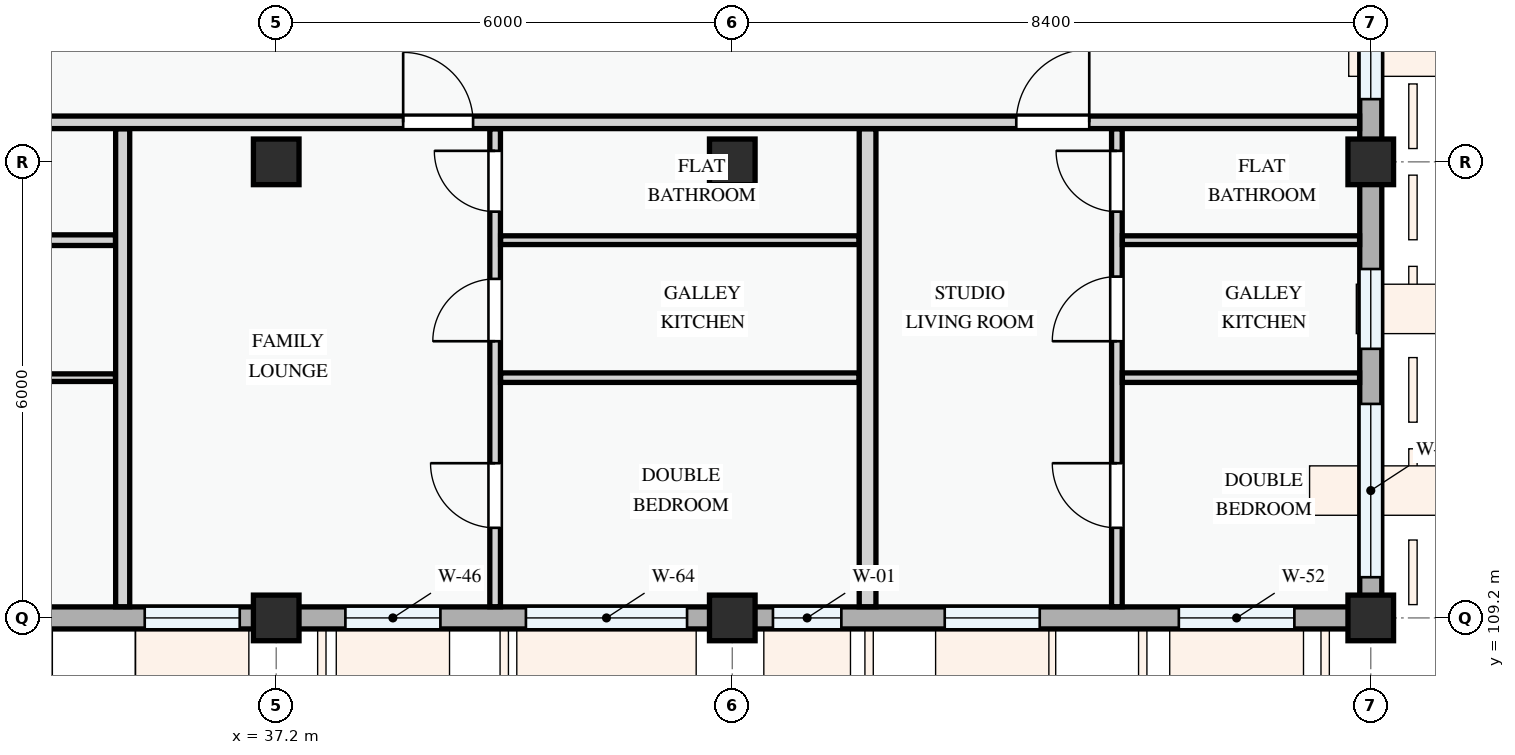
"""IFC4 building model, lengths in metres.
Left out: names, types, materials, properties, quantities, classifications, styles, units other than length and angle.
Written with IfcOpenShell. Run it as: python <this file> out.ifc"""

import sys

from ifc_helpers import new_model, si_unit, direction, frame, frame_2d, origin, origin_2d, place, context, subcontext, project, spatial, rectangle, extrude, element, fill, save


model = new_model("IFC4")
c1 = context("Model", 3, precision=1e-05, world=origin(), true_north=direction((0.0, 1.0)))
c2 = subcontext(c1, "Body", "Model", "MODEL_VIEW")
j1 = project(units=[si_unit("LENGTHUNIT", "METRE"), si_unit("PLANEANGLEUNIT", "RADIAN")], contexts=[c1])
p1 = place(None, origin())
s1 = spatial("IfcSite", under=j1, at=p1, CompositionType="ELEMENT")
p2 = place(p1, origin())
s2 = spatial("IfcBuilding", under=s1, at=p2, CompositionType="ELEMENT")
p3 = place(p2, frame((0.0, 0.0, 27.9)))
s3 = spatial("IfcBuildingStorey", under=s2, at=p3, CompositionType="ELEMENT", Elevation=27.9)
for number, where, z_axis, x_axis in (
    (1, (37.2, 109.2, 0.0), (0.0, 0.0, 1.0), (1.0, 0.0, 0.0)),
    (2, (37.2, 115.2, 0.0), (0.0, 0.0, 1.0), (1.0, 0.0, 0.0)),
    (3, (43.2, 109.2, 0.0), (0.0, 0.0, 1.0), (1.0, 0.0, 0.0)),
    (4, (43.2, 115.2, 0.0), (0.0, 0.0, 1.0), (1.0, 0.0, 0.0)),
    (5, (51.6, 109.2, 0.0), (0.0, 0.0, 1.0), (1.0, 0.0, 0.0)),
    (6, (51.6, 115.2, 0.0), (0.0, 0.0, 1.0), (1.0, 0.0, 0.0)),
):
    element("IfcColumn", number, at=place(p3, frame(where, z_axis=z_axis, x_axis=x_axis)), inside=s3, PredefinedType="COLUMN", context=c2, shape_type="SweptSolid", body=[
        extrude(rectangle(XDim=0.6, YDim=0.6, at=origin_2d()), origin(), (0.0, 0.0, 1.0), 3.3),
    ])
p4 = place(p3, frame((28.8, 109.2, 0.0), z_axis=(0.0, 0.0, 1.0), x_axis=(1.0, 0.0, 0.0)))
e7 = element("IfcWall", 7, at=p4, inside=s3, PredefinedType="STANDARD", context=c2, shape_type="SweptSolid", body=[
    extrude(rectangle(XDim=8.4, YDim=0.29, at=frame_2d((4.2, 0.0))), origin(), (0.0, 0.0, 1.0), 2.375),
])
p5 = place(p4, frame((0.478, 0.0, 0.78)))
e8 = element("IfcOpeningElement", 8, at=p5, cuts=e7, PredefinedType="OPENING", context=c2, shape_type="SweptSolid", body=[
    extrude(rectangle(XDim=1.0, YDim=1.25, at=frame_2d((0.5, 0.625))), frame((0.0, 0.155, 0.0), z_axis=(0.0, -1.0, 0.0), x_axis=(1.0, 0.0, 0.0)), (0.0, 0.0, 1.0), 0.31),
])
p6 = place(p4, frame((3.548, 0.0, 0.78)))
e9 = element("IfcOpeningElement", 9, at=p6, cuts=e7, PredefinedType="OPENING", context=c2, shape_type="SweptSolid", body=[
    extrude(rectangle(XDim=1.05, YDim=1.2, at=frame_2d((0.525, 0.6))), frame((0.0, 0.155, 0.0), z_axis=(0.0, -1.0, 0.0), x_axis=(1.0, 0.0, 0.0)), (0.0, 0.0, 1.0), 0.31),
])
p7 = place(p4, frame((6.67, 0.0, 0.78)))
e10 = element("IfcOpeningElement", 10, at=p7, cuts=e7, PredefinedType="OPENING", context=c2, shape_type="SweptSolid", body=[
    extrude(rectangle(XDim=1.25, YDim=1.45, at=frame_2d((0.625, 0.725))), frame((0.0, 0.155, 0.0), z_axis=(0.0, -1.0, 0.0), x_axis=(1.0, 0.0, 0.0)), (0.0, 0.0, 1.0), 0.31),
])
p8 = place(p3, frame((37.2, 109.2, 0.0), z_axis=(0.0, 0.0, 1.0), x_axis=(1.0, 0.0, 0.0)))
e11 = element("IfcWall", 11, at=p8, inside=s3, PredefinedType="STANDARD", context=c2, shape_type="SweptSolid", body=[
    extrude(rectangle(XDim=6.0, YDim=0.29, at=frame_2d((3.0, 0.0))), origin(), (0.0, 0.0, 1.0), 2.475),
])
p9 = place(p8, frame((0.91, 0.0, 0.78)))
e12 = element("IfcOpeningElement", 12, at=p9, cuts=e11, PredefinedType="OPENING", context=c2, shape_type="SweptSolid", body=[
    extrude(rectangle(XDim=1.25, YDim=1.3, at=frame_2d((0.625, 0.65))), frame((0.0, 0.155, 0.0), z_axis=(0.0, -1.0, 0.0), x_axis=(1.0, 0.0, 0.0)), (0.0, 0.0, 1.0), 0.31),
])
p10 = place(p8, frame((3.285, 0.0, 0.78)))
e13 = element("IfcOpeningElement", 13, at=p10, cuts=e11, PredefinedType="OPENING", context=c2, shape_type="SweptSolid", body=[
    extrude(rectangle(XDim=2.12, YDim=1.44, at=frame_2d((1.06, 0.72))), frame((0.0, 0.155, 0.0), z_axis=(0.0, -1.0, 0.0), x_axis=(1.0, 0.0, 0.0)), (0.0, 0.0, 1.0), 0.31),
])
p11 = place(p3, frame((43.2, 109.2, 0.0), z_axis=(0.0, 0.0, 1.0), x_axis=(1.0, 0.0, 0.0)))
e14 = element("IfcWall", 14, at=p11, inside=s3, PredefinedType="STANDARD", context=c2, shape_type="SweptSolid", body=[
    extrude(rectangle(XDim=8.4, YDim=0.29, at=frame_2d((4.2, 0.0))), origin(), (0.0, 0.0, 1.0), 2.375),
])
p12 = place(p11, frame((0.535, 0.0, 0.78)))
e15 = element("IfcOpeningElement", 15, at=p12, cuts=e14, PredefinedType="OPENING", context=c2, shape_type="SweptSolid", body=[
    extrude(rectangle(XDim=0.9, YDim=1.2, at=frame_2d((0.45, 0.6))), frame((0.0, 0.155, 0.0), z_axis=(0.0, -1.0, 0.0), x_axis=(1.0, 0.0, 0.0)), (0.0, 0.0, 1.0), 0.31),
])
p13 = place(p11, frame((2.795, 0.0, 0.78)))
e16 = element("IfcOpeningElement", 16, at=p13, cuts=e14, PredefinedType="OPENING", context=c2, shape_type="SweptSolid", body=[
    extrude(rectangle(XDim=1.25, YDim=1.3, at=frame_2d((0.625, 0.65))), frame((0.0, 0.155, 0.0), z_axis=(0.0, -1.0, 0.0), x_axis=(1.0, 0.0, 0.0)), (0.0, 0.0, 1.0), 0.31),
])
p14 = place(p11, frame((5.875, 0.0, 0.78)))
e17 = element("IfcOpeningElement", 17, at=p14, cuts=e14, PredefinedType="OPENING", context=c2, shape_type="SweptSolid", body=[
    extrude(rectangle(XDim=1.52, YDim=1.42, at=frame_2d((0.76, 0.71))), frame((0.0, 0.155, 0.0), z_axis=(0.0, -1.0, 0.0), x_axis=(1.0, 0.0, 0.0)), (0.0, 0.0, 1.0), 0.31),
])
p15 = place(p3, frame((51.6, 109.2, 0.0), z_axis=(0.0, 0.0, 1.0), x_axis=(0.0, 1.0, 0.0)))
e18 = element("IfcWall", 18, at=p15, inside=s3, PredefinedType="STANDARD", context=c2, shape_type="SweptSolid", body=[
    extrude(rectangle(XDim=6.0, YDim=0.29, at=frame_2d((3.0, 0.0))), origin(), (0.0, 0.0, 1.0), 2.575),
])
p16 = place(p15, frame((0.535, 0.0, 0.78)))
e19 = element("IfcOpeningElement", 19, at=p16, cuts=e18, PredefinedType="OPENING", context=c2, shape_type="SweptSolid", body=[
    extrude(rectangle(XDim=2.28, YDim=1.46, at=frame_2d((1.14, 0.73))), frame((0.0, 0.155, 0.0), z_axis=(0.0, -1.0, 0.0), x_axis=(1.0, 0.0, 0.0)), (0.0, 0.0, 1.0), 0.31),
])
p17 = place(p15, frame((3.54, 0.0, 0.78)))
e20 = element("IfcOpeningElement", 20, at=p17, cuts=e18, PredefinedType="OPENING", context=c2, shape_type="SweptSolid", body=[
    extrude(rectangle(XDim=1.05, YDim=1.2, at=frame_2d((0.525, 0.6))), frame((0.0, 0.155, 0.0), z_axis=(0.0, -1.0, 0.0), x_axis=(1.0, 0.0, 0.0)), (0.0, 0.0, 1.0), 0.31),
])
p18 = place(p3, frame((51.6, 115.2, 0.0), z_axis=(0.0, 0.0, 1.0), x_axis=(0.0, 1.0, 0.0)))
e21 = element("IfcWall", 21, at=p18, inside=s3, PredefinedType="STANDARD", context=c2, shape_type="SweptSolid", body=[
    extrude(rectangle(XDim=8.4, YDim=0.29, at=frame_2d((4.2, 0.0))), origin(), (0.0, 0.0, 1.0), 2.425),
])
p19 = place(p18, frame((0.825, 0.0, 0.78)))
e22 = element("IfcOpeningElement", 22, at=p19, cuts=e21, PredefinedType="OPENING", context=c2, shape_type="SweptSolid", body=[
    extrude(rectangle(XDim=1.25, YDim=1.3, at=frame_2d((0.625, 0.65))), frame((0.0, 0.155, 0.0), z_axis=(0.0, -1.0, 0.0), x_axis=(1.0, 0.0, 0.0)), (0.0, 0.0, 1.0), 0.31),
])
p20 = place(p18, frame((4.17, 0.0, 0.78)))
e23 = element("IfcOpeningElement", 23, at=p20, cuts=e21, PredefinedType="OPENING", context=c2, shape_type="SweptSolid", body=[
    extrude(rectangle(XDim=0.95, YDim=1.15, at=frame_2d((0.475, 0.575))), frame((0.0, 0.155, 0.0), z_axis=(0.0, -1.0, 0.0), x_axis=(1.0, 0.0, 0.0)), (0.0, 0.0, 1.0), 0.31),
])
p21 = place(p18, frame((6.055, 0.0, 0.78)))
e24 = element("IfcOpeningElement", 24, at=p21, cuts=e21, PredefinedType="OPENING", context=c2, shape_type="SweptSolid", body=[
    extrude(rectangle(XDim=1.58, YDim=1.48, at=frame_2d((0.79, 0.74))), frame((0.0, 0.155, 0.0), z_axis=(0.0, -1.0, 0.0), x_axis=(1.0, 0.0, 0.0)), (0.0, 0.0, 1.0), 0.31),
])
p22 = place(p3, frame((30.625, 112.361, 0.0), z_axis=(0.0, 0.0, 1.0), x_axis=(1.0, 0.0, 0.0)))
e25 = element("IfcWall", 25, at=p22, inside=s3, PredefinedType="PARTITIONING", context=c2, shape_type="SweptSolid", body=[
    extrude(rectangle(XDim=4.461, YDim=0.1, at=frame_2d((2.23, 0.0))), origin(), (0.0, 0.0, 1.0), 3.0),
])
p23 = place(p3, frame((30.625, 114.17, 0.0), z_axis=(0.0, 0.0, 1.0), x_axis=(1.0, 0.0, 0.0)))
e26 = element("IfcWall", 26, at=p23, inside=s3, PredefinedType="PARTITIONING", context=c2, shape_type="SweptSolid", body=[
    extrude(rectangle(XDim=4.461, YDim=0.14, at=frame_2d((2.23, 0.0))), origin(), (0.0, 0.0, 1.0), 3.0),
])
p24 = place(p3, frame((40.08, 109.347, 0.0), z_axis=(0.0, 0.0, 1.0), x_axis=(0.0, 1.0, 0.0)))
e27 = element("IfcWall", 27, at=p24, inside=s3, PredefinedType="PARTITIONING", context=c2, shape_type="SweptSolid", body=[
    extrude(rectangle(XDim=6.289, YDim=0.14, at=frame_2d((3.144, 0.0))), origin(), (0.0, 0.0, 1.0), 3.0),
])
p25 = place(p24, frame((1.038, 0.0, 0.0)))
e28 = element("IfcOpeningElement", 28, at=p25, cuts=e27, PredefinedType="OPENING", context=c2, shape_type="SweptSolid", body=[
    extrude(rectangle(XDim=0.85, YDim=2.1, at=frame_2d((0.425, 1.05))), frame((0.0, 0.08, 0.0), z_axis=(0.0, -1.0, 0.0), x_axis=(1.0, 0.0, 0.0)), (0.0, 0.0, 1.0), 0.16),
])
p26 = place(p24, frame((3.493, 0.0, 0.0)))
e29 = element("IfcOpeningElement", 29, at=p26, cuts=e27, PredefinedType="OPENING", context=c2, shape_type="SweptSolid", body=[
    extrude(rectangle(XDim=0.82, YDim=2.08, at=frame_2d((0.41, 1.04))), frame((0.0, 0.08, 0.0), z_axis=(0.0, -1.0, 0.0), x_axis=(1.0, 0.0, 0.0)), (0.0, 0.0, 1.0), 0.16),
])
p27 = place(p24, frame((5.198, 0.0, 0.0)))
e30 = element("IfcOpeningElement", 30, at=p27, cuts=e27, PredefinedType="OPENING", context=c2, shape_type="SweptSolid", body=[
    extrude(rectangle(XDim=0.8, YDim=2.1, at=frame_2d((0.4, 1.05))), frame((0.0, 0.08, 0.0), z_axis=(0.0, -1.0, 0.0), x_axis=(1.0, 0.0, 0.0)), (0.0, 0.0, 1.0), 0.16),
])
p28 = place(p3, frame((40.152, 112.361, 0.0), z_axis=(0.0, 0.0, 1.0), x_axis=(1.0, 0.0, 0.0)))
e31 = element("IfcWall", 31, at=p28, inside=s3, PredefinedType="PARTITIONING", context=c2, shape_type="SweptSolid", body=[
    extrude(rectangle(XDim=4.716, YDim=0.125, at=frame_2d((2.358, 0.0))), origin(), (0.0, 0.0, 1.0), 3.0),
])
p29 = place(p3, frame((40.152, 114.17, 0.0), z_axis=(0.0, 0.0, 1.0), x_axis=(1.0, 0.0, 0.0)))
e32 = element("IfcWall", 32, at=p29, inside=s3, PredefinedType="PARTITIONING", context=c2, shape_type="SweptSolid", body=[
    extrude(rectangle(XDim=4.716, YDim=0.115, at=frame_2d((2.358, 0.0))), origin(), (0.0, 0.0, 1.0), 3.0),
])
p30 = place(p3, frame((35.18, 109.347, 0.0), z_axis=(0.0, 0.0, 1.0), x_axis=(0.0, 1.0, 0.0)))
e33 = element("IfcWall", 33, at=p30, inside=s3, PredefinedType="PARTITIONING", context=c2, shape_type="SweptSolid", body=[
    extrude(rectangle(XDim=6.289, YDim=0.185, at=frame_2d((3.144, 0.0))), origin(), (0.0, 0.0, 1.0), 3.0),
])
p31 = place(p3, frame((48.26, 109.347, 0.0), z_axis=(0.0, 0.0, 1.0), x_axis=(0.0, 1.0, 0.0)))
e34 = element("IfcWall", 34, at=p31, inside=s3, PredefinedType="PARTITIONING", context=c2, shape_type="SweptSolid", body=[
    extrude(rectangle(XDim=6.289, YDim=0.14, at=frame_2d((3.144, 0.0))), origin(), (0.0, 0.0, 1.0), 3.0),
])
p32 = place(p31, frame((1.038, 0.0, 0.0)))
e35 = element("IfcOpeningElement", 35, at=p32, cuts=e34, PredefinedType="OPENING", context=c2, shape_type="SweptSolid", body=[
    extrude(rectangle(XDim=0.85, YDim=2.1, at=frame_2d((0.425, 1.05))), frame((0.0, 0.08, 0.0), z_axis=(0.0, -1.0, 0.0), x_axis=(1.0, 0.0, 0.0)), (0.0, 0.0, 1.0), 0.16),
])
p33 = place(p31, frame((3.493, 0.0, 0.0)))
e36 = element("IfcOpeningElement", 36, at=p33, cuts=e34, PredefinedType="OPENING", context=c2, shape_type="SweptSolid", body=[
    extrude(rectangle(XDim=0.85, YDim=2.1, at=frame_2d((0.425, 1.05))), frame((0.0, 0.08, 0.0), z_axis=(0.0, -1.0, 0.0), x_axis=(1.0, 0.0, 0.0)), (0.0, 0.0, 1.0), 0.16),
])
p34 = place(p31, frame((5.198, 0.0, 0.0)))
e37 = element("IfcOpeningElement", 37, at=p34, cuts=e34, PredefinedType="OPENING", context=c2, shape_type="SweptSolid", body=[
    extrude(rectangle(XDim=0.8, YDim=2.1, at=frame_2d((0.4, 1.05))), frame((0.0, 0.08, 0.0), z_axis=(0.0, -1.0, 0.0), x_axis=(1.0, 0.0, 0.0)), (0.0, 0.0, 1.0), 0.16),
])
p35 = place(p3, frame((48.332, 112.361, 0.0), z_axis=(0.0, 0.0, 1.0), x_axis=(1.0, 0.0, 0.0)))
e38 = element("IfcWall", 38, at=p35, inside=s3, PredefinedType="PARTITIONING", context=c2, shape_type="SweptSolid", body=[
    extrude(rectangle(XDim=3.121, YDim=0.125, at=frame_2d((1.561, 0.0))), origin(), (0.0, 0.0, 1.0), 3.0),
])
p36 = place(p3, frame((48.332, 114.17, 0.0), z_axis=(0.0, 0.0, 1.0), x_axis=(1.0, 0.0, 0.0)))
e39 = element("IfcWall", 39, at=p36, inside=s3, PredefinedType="PARTITIONING", context=c2, shape_type="SweptSolid", body=[
    extrude(rectangle(XDim=3.121, YDim=0.115, at=frame_2d((1.561, 0.0))), origin(), (0.0, 0.0, 1.0), 3.0),
])
p37 = place(p3, frame((44.98, 109.347, 0.0), z_axis=(0.0, 0.0, 1.0), x_axis=(0.0, 1.0, 0.0)))
e40 = element("IfcWall", 40, at=p37, inside=s3, PredefinedType="PARTITIONING", context=c2, shape_type="SweptSolid", body=[
    extrude(rectangle(XDim=6.289, YDim=0.22, at=frame_2d((3.144, 0.0))), origin(), (0.0, 0.0, 1.0), 3.0),
])
p38 = place(p3, frame((25.15, 115.72, 0.0), z_axis=(0.0, 0.0, 1.0), x_axis=(1.0, 0.0, 0.0)))
e41 = element("IfcWall", 41, at=p38, inside=s3, PredefinedType="PARTITIONING", context=c2, shape_type="SweptSolid", body=[
    extrude(rectangle(XDim=26.303, YDim=0.165, at=frame_2d((13.151, 0.0))), origin(), (0.0, 0.0, 1.0), 3.0),
])
p39 = place(p38, frame((0.25, 0.0, 0.0)))
e42 = element("IfcOpeningElement", 42, at=p39, cuts=e41, PredefinedType="OPENING", context=c2, shape_type="SweptSolid", body=[
    extrude(rectangle(XDim=0.92, YDim=2.1, at=frame_2d((0.46, 1.05))), frame((0.0, 0.093, 0.0), z_axis=(0.0, -1.0, 0.0), x_axis=(1.0, 0.0, 0.0)), (0.0, 0.0, 1.0), 0.185),
])
p40 = place(p38, frame((13.72, 0.0, 0.0)))
e43 = element("IfcOpeningElement", 43, at=p40, cuts=e41, PredefinedType="OPENING", context=c2, shape_type="SweptSolid", body=[
    extrude(rectangle(XDim=0.92, YDim=2.1, at=frame_2d((0.46, 1.05))), frame((0.0, 0.093, 0.0), z_axis=(0.0, -1.0, 0.0), x_axis=(1.0, 0.0, 0.0)), (0.0, 0.0, 1.0), 0.185),
])
p41 = place(p38, frame((21.786, 0.0, 0.0)))
e44 = element("IfcOpeningElement", 44, at=p41, cuts=e41, PredefinedType="OPENING", context=c2, shape_type="SweptSolid", body=[
    extrude(rectangle(XDim=0.96, YDim=2.12, at=frame_2d((0.48, 1.06))), frame((0.0, 0.093, 0.0), z_axis=(0.0, -1.0, 0.0), x_axis=(1.0, 0.0, 0.0)), (0.0, 0.0, 1.0), 0.185),
])
p42 = place(p7, origin())
e45 = element("IfcWindow", 45, at=p42, inside=s3, PartitioningType="SINGLE_PANEL", PredefinedType="WINDOW", context=c2, shape_type="SweptSolid", body=[
    extrude(rectangle(XDim=1.25, YDim=1.45, at=frame_2d((0.625, 0.725))), frame((0.0, 0.03, 0.0), z_axis=(0.0, -1.0, 0.0), x_axis=(1.0, 0.0, 0.0)), (0.0, 0.0, 1.0), 0.06),
])
fill(e10, e45)
p43 = place(p9, origin())
e46 = element("IfcWindow", 46, at=p43, inside=s3, PartitioningType="SINGLE_PANEL", PredefinedType="WINDOW", context=c2, shape_type="SweptSolid", body=[
    extrude(rectangle(XDim=1.25, YDim=1.3, at=frame_2d((0.625, 0.65))), frame((0.0, 0.03, 0.0), z_axis=(0.0, -1.0, 0.0), x_axis=(1.0, 0.0, 0.0)), (0.0, 0.0, 1.0), 0.06),
])
fill(e12, e46)
p44 = place(p10, origin())
e47 = element("IfcWindow", 47, at=p44, inside=s3, PartitioningType="DOUBLE_PANEL_VERTICAL", PredefinedType="WINDOW", context=c2, shape_type="SweptSolid", body=[
    extrude(rectangle(XDim=2.12, YDim=1.44, at=frame_2d((1.06, 0.72))), frame((0.0, 0.03, 0.0), z_axis=(0.0, -1.0, 0.0), x_axis=(1.0, 0.0, 0.0)), (0.0, 0.0, 1.0), 0.06),
])
fill(e13, e47)
p45 = place(p12, origin())
e48 = element("IfcWindow", 48, at=p45, inside=s3, PartitioningType="SINGLE_PANEL", PredefinedType="WINDOW", context=c2, shape_type="SweptSolid", body=[
    extrude(rectangle(XDim=0.9, YDim=1.2, at=frame_2d((0.45, 0.6))), frame((0.0, 0.03, 0.0), z_axis=(0.0, -1.0, 0.0), x_axis=(1.0, 0.0, 0.0)), (0.0, 0.0, 1.0), 0.06),
])
fill(e15, e48)
p46 = place(p13, origin())
e49 = element("IfcWindow", 49, at=p46, inside=s3, PartitioningType="SINGLE_PANEL", PredefinedType="WINDOW", context=c2, shape_type="SweptSolid", body=[
    extrude(rectangle(XDim=1.25, YDim=1.3, at=frame_2d((0.625, 0.65))), frame((0.0, 0.03, 0.0), z_axis=(0.0, -1.0, 0.0), x_axis=(1.0, 0.0, 0.0)), (0.0, 0.0, 1.0), 0.06),
])
fill(e16, e49)
p47 = place(p14, origin())
e50 = element("IfcWindow", 50, at=p47, inside=s3, PartitioningType="SINGLE_PANEL", PredefinedType="WINDOW", context=c2, shape_type="SweptSolid", body=[
    extrude(rectangle(XDim=1.52, YDim=1.42, at=frame_2d((0.76, 0.71))), frame((0.0, 0.03, 0.0), z_axis=(0.0, -1.0, 0.0), x_axis=(1.0, 0.0, 0.0)), (0.0, 0.0, 1.0), 0.06),
])
fill(e17, e50)
p48 = place(p16, origin())
e51 = element("IfcWindow", 51, at=p48, inside=s3, PartitioningType="DOUBLE_PANEL_VERTICAL", PredefinedType="WINDOW", context=c2, shape_type="SweptSolid", body=[
    extrude(rectangle(XDim=2.28, YDim=1.46, at=frame_2d((1.14, 0.73))), frame((0.0, 0.03, 0.0), z_axis=(0.0, -1.0, 0.0), x_axis=(1.0, 0.0, 0.0)), (0.0, 0.0, 1.0), 0.06),
])
fill(e19, e51)
p49 = place(p17, origin())
e52 = element("IfcWindow", 52, at=p49, inside=s3, PartitioningType="SINGLE_PANEL", PredefinedType="WINDOW", context=c2, shape_type="SweptSolid", body=[
    extrude(rectangle(XDim=1.05, YDim=1.2, at=frame_2d((0.525, 0.6))), frame((0.0, 0.03, 0.0), z_axis=(0.0, -1.0, 0.0), x_axis=(1.0, 0.0, 0.0)), (0.0, 0.0, 1.0), 0.06),
])
fill(e20, e52)
p50 = place(p19, origin())
e53 = element("IfcWindow", 53, at=p50, inside=s3, PartitioningType="SINGLE_PANEL", PredefinedType="WINDOW", context=c2, shape_type="SweptSolid", body=[
    extrude(rectangle(XDim=1.25, YDim=1.3, at=frame_2d((0.625, 0.65))), frame((0.0, 0.03, 0.0), z_axis=(0.0, -1.0, 0.0), x_axis=(1.0, 0.0, 0.0)), (0.0, 0.0, 1.0), 0.06),
])
fill(e22, e53)
p51 = place(p25, origin())
e54 = element("IfcDoor", 54, at=p51, inside=s3, OperationType="SINGLE_SWING_RIGHT", PredefinedType="DOOR", context=c2, shape_type="SweptSolid", body=[
    extrude(rectangle(XDim=0.85, YDim=2.1, at=frame_2d((0.425, 1.05))), frame((0.0, 0.025, 0.0), z_axis=(0.0, -1.0, 0.0), x_axis=(1.0, 0.0, 0.0)), (0.0, 0.0, 1.0), 0.05),
])
fill(e28, e54)
p52 = place(p26, origin())
e55 = element("IfcDoor", 55, at=p52, inside=s3, OperationType="SINGLE_SWING_LEFT", PredefinedType="DOOR", context=c2, shape_type="SweptSolid", body=[
    extrude(rectangle(XDim=0.82, YDim=2.08, at=frame_2d((0.41, 1.04))), frame((0.0, 0.025, 0.0), z_axis=(0.0, -1.0, 0.0), x_axis=(1.0, 0.0, 0.0)), (0.0, 0.0, 1.0), 0.05),
])
fill(e29, e55)
p53 = place(p27, origin())
e56 = element("IfcDoor", 56, at=p53, inside=s3, OperationType="SINGLE_SWING_RIGHT", PredefinedType="DOOR", context=c2, shape_type="SweptSolid", body=[
    extrude(rectangle(XDim=0.8, YDim=2.1, at=frame_2d((0.4, 1.05))), frame((0.0, 0.025, 0.0), z_axis=(0.0, -1.0, 0.0), x_axis=(1.0, 0.0, 0.0)), (0.0, 0.0, 1.0), 0.05),
])
fill(e30, e56)
p54 = place(p32, origin())
e57 = element("IfcDoor", 57, at=p54, inside=s3, OperationType="SINGLE_SWING_RIGHT", PredefinedType="DOOR", context=c2, shape_type="SweptSolid", body=[
    extrude(rectangle(XDim=0.85, YDim=2.1, at=frame_2d((0.425, 1.05))), frame((0.0, 0.025, 0.0), z_axis=(0.0, -1.0, 0.0), x_axis=(1.0, 0.0, 0.0)), (0.0, 0.0, 1.0), 0.05),
])
fill(e35, e57)
p55 = place(p33, origin())
e58 = element("IfcDoor", 58, at=p55, inside=s3, OperationType="SINGLE_SWING_LEFT", PredefinedType="DOOR", context=c2, shape_type="SweptSolid", body=[
    extrude(rectangle(XDim=0.85, YDim=2.1, at=frame_2d((0.425, 1.05))), frame((0.0, 0.025, 0.0), z_axis=(0.0, -1.0, 0.0), x_axis=(1.0, 0.0, 0.0)), (0.0, 0.0, 1.0), 0.05),
])
fill(e36, e58)
p56 = place(p34, origin())
e59 = element("IfcDoor", 59, at=p56, inside=s3, OperationType="SINGLE_SWING_RIGHT", PredefinedType="DOOR", context=c2, shape_type="SweptSolid", body=[
    extrude(rectangle(XDim=0.8, YDim=2.1, at=frame_2d((0.4, 1.05))), frame((0.0, 0.025, 0.0), z_axis=(0.0, -1.0, 0.0), x_axis=(1.0, 0.0, 0.0)), (0.0, 0.0, 1.0), 0.05),
])
fill(e37, e59)
p57 = place(p40, origin())
e60 = element("IfcDoor", 60, at=p57, inside=s3, OperationType="SINGLE_SWING_LEFT", PredefinedType="DOOR", context=c2, shape_type="SweptSolid", body=[
    extrude(rectangle(XDim=0.92, YDim=2.1, at=frame_2d((0.46, 1.05))), frame((0.0, 0.025, 0.0), z_axis=(0.0, -1.0, 0.0), x_axis=(1.0, 0.0, 0.0)), (0.0, 0.0, 1.0), 0.05),
])
fill(e43, e60)
p58 = place(p41, origin())
e61 = element("IfcDoor", 61, at=p58, inside=s3, OperationType="SINGLE_SWING_RIGHT", PredefinedType="DOOR", context=c2, shape_type="SweptSolid", body=[
    extrude(rectangle(XDim=0.96, YDim=2.12, at=frame_2d((0.48, 1.06))), frame((0.0, 0.025, 0.0), z_axis=(0.0, -1.0, 0.0), x_axis=(1.0, 0.0, 0.0)), (0.0, 0.0, 1.0), 0.05),
])
fill(e44, e61)
save(model, sys.argv[1])
